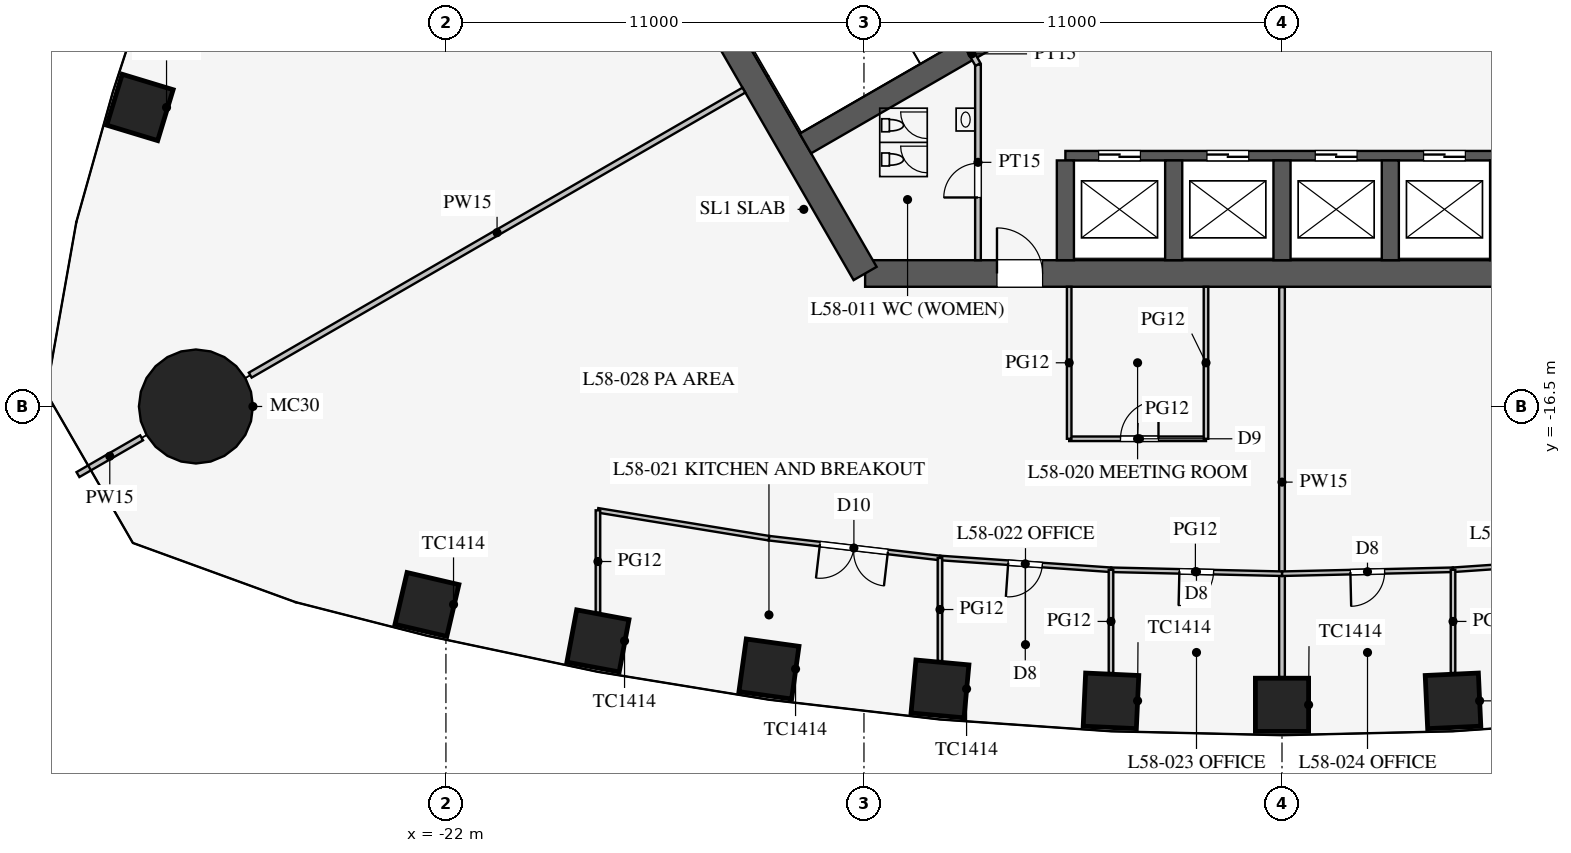
"""IFC4 building model, lengths in metres.
Left out: names, types, materials, properties, quantities, classifications, styles, units other than length and angle.
Written with IfcOpenShell. Run it as: python <this file> out.ifc"""

import sys

from ifc_helpers import new_model, si_unit, direction, frame, frame_2d, origin, origin_2d, place, context, subcontext, project, spatial, rectangle, circle, extrude, element, fill, save


model = new_model("IFC4")
c1 = context("Model", 3, precision=1e-05, world=origin(), true_north=direction((0.0, 1.0)))
c2 = subcontext(c1, "Body", "Model", "MODEL_VIEW")
j1 = project(units=[si_unit("LENGTHUNIT", "METRE"), si_unit("PLANEANGLEUNIT", "RADIAN")], contexts=[c1])
p1 = place(None, origin())
s1 = spatial("IfcSite", under=j1, at=p1, CompositionType="ELEMENT")
p2 = place(p1, origin())
s2 = spatial("IfcBuilding", under=s1, at=p2, CompositionType="ELEMENT")
p3 = place(p2, frame((0.0, 0.0, 252.7)))
s3 = spatial("IfcBuildingStorey", under=s2, at=p3, CompositionType="ELEMENT", Elevation=252.7)
for number, where, z_axis, x_axis in (
    (1, (-22.5, -21.71, 0.0), (0.0, 0.0, 1.0), (0.974, -0.227, 0.0)),
    (2, (-18.0, -22.669, 0.0), (0.0, 0.0, 1.0), (0.983, -0.184, 0.0)),
    (3, (-13.5, -23.408, 0.0), (0.0, 0.0, 1.0), (0.99, -0.138, 0.0)),
    (4, (-9.0, -23.933, 0.0), (0.0, 0.0, 1.0), (0.996, -0.092, 0.0)),
    (5, (-4.5, -24.246, 0.0), (0.0, 0.0, 1.0), (0.999, -0.046, 0.0)),
    (6, (0.0, -24.351, 0.0), (0.0, 0.0, 1.0), (1.0, 0.0, 0.0)),
    (7, (4.5, -24.246, 0.0), (0.0, 0.0, 1.0), (0.999, 0.046, 0.0)),
    (8, (-30.052, -8.63, 0.0), (0.0, 0.0, 1.0), (-0.29, -0.957, 0.0)),
):
    element("IfcColumn", number, at=place(p3, frame(where, z_axis=z_axis, x_axis=x_axis)), inside=s3, PredefinedType="COLUMN", context=c2, shape_type="SweptSolid", body=[
        extrude(rectangle(XDim=1.4, YDim=1.4, at=origin_2d()), origin(), (0.0, 0.0, 1.0), 4.2),
    ])
p4 = place(p3, frame((-28.579, -16.5, 0.0), z_axis=(0.0, 0.0, 1.0), x_axis=(1.0, 0.0, 0.0)))
e9 = element("IfcColumn", 9, at=p4, inside=s3, PredefinedType="COLUMN", context=c2, shape_type="SweptSolid", body=[
    extrude(circle(Radius=1.5, at=origin_2d()), origin(), (0.0, 0.0, 1.0), 4.2),
])
p5 = place(p3, frame((-10.97, -13.0, 0.0), z_axis=(0.0, 0.0, 1.0), x_axis=(1.0, 0.0, 0.0)))
e10 = element("IfcWall", 10, at=p5, inside=s3, PredefinedType="SHEAR", context=c2, shape_type="SweptSolid", body=[
    extrude(rectangle(XDim=21.939, YDim=0.7, at=frame_2d((10.97, 0.0))), origin(), (0.0, 0.0, 1.0), 4.2),
])
p6 = place(p5, frame((17.27, 0.0, 0.0)))
e11 = element("IfcOpeningElement", 11, at=p6, cuts=e10, PredefinedType="OPENING", context=c2, shape_type="SweptSolid", body=[
    extrude(rectangle(XDim=1.2, YDim=2.1, at=frame_2d((0.6, 1.05))), frame((0.0, 0.36, 0.0), z_axis=(0.0, -1.0, 0.0), x_axis=(1.0, 0.0, 0.0)), (0.0, 0.0, 1.0), 0.72),
])
p7 = place(p5, frame((3.47, 0.0, 0.0)))
e12 = element("IfcOpeningElement", 12, at=p7, cuts=e10, PredefinedType="OPENING", context=c2, shape_type="SweptSolid", body=[
    extrude(rectangle(XDim=1.2, YDim=2.1, at=frame_2d((0.6, 1.05))), frame((0.0, 0.36, 0.0), z_axis=(0.0, -1.0, 0.0), x_axis=(1.0, 0.0, 0.0)), (0.0, 0.0, 1.0), 0.72),
])
p8 = place(p3, frame((-16.743, -3.0, 0.0), z_axis=(0.0, 0.0, 1.0), x_axis=(0.499995765644, -0.866027848477, 0.0)))
e13 = element("IfcWall", 13, at=p8, inside=s3, PredefinedType="SHEAR", context=c2, shape_type="SweptSolid", body=[
    extrude(rectangle(XDim=11.547, YDim=0.7, at=frame_2d((5.773, 0.0))), origin(), (0.0, 0.0, 1.0), 4.2),
])
p9 = place(p3, frame((-5.7, -9.9, 0.0), z_axis=(0.0, 0.0, 1.0), x_axis=(1.0, 0.0, 0.0)))
e14 = element("IfcWall", 14, at=p9, inside=s3, PredefinedType="SHEAR", context=c2, shape_type="SweptSolid", body=[
    extrude(rectangle(XDim=11.4, YDim=0.25, at=frame_2d((5.7, 0.0))), origin(), (0.0, 0.0, 1.0), 4.2),
])
p10 = place(p9, frame((0.875, 0.0, 0.0)))
e15 = element("IfcOpeningElement", 15, at=p10, cuts=e14, PredefinedType="OPENING", context=c2, shape_type="SweptSolid", body=[
    extrude(rectangle(XDim=1.1, YDim=2.2, at=frame_2d((0.55, 1.1))), frame((0.0, 0.135, 0.0), z_axis=(0.0, -1.0, 0.0), x_axis=(1.0, 0.0, 0.0)), (0.0, 0.0, 1.0), 0.27),
])
p11 = place(p9, frame((3.725, 0.0, 0.0)))
e16 = element("IfcOpeningElement", 16, at=p11, cuts=e14, PredefinedType="OPENING", context=c2, shape_type="SweptSolid", body=[
    extrude(rectangle(XDim=1.1, YDim=2.2, at=frame_2d((0.55, 1.1))), frame((0.0, 0.135, 0.0), z_axis=(0.0, -1.0, 0.0), x_axis=(1.0, 0.0, 0.0)), (0.0, 0.0, 1.0), 0.27),
])
p12 = place(p9, frame((6.575, 0.0, 0.0)))
e17 = element("IfcOpeningElement", 17, at=p12, cuts=e14, PredefinedType="OPENING", context=c2, shape_type="SweptSolid", body=[
    extrude(rectangle(XDim=1.1, YDim=2.2, at=frame_2d((0.55, 1.1))), frame((0.0, 0.135, 0.0), z_axis=(0.0, -1.0, 0.0), x_axis=(1.0, 0.0, 0.0)), (0.0, 0.0, 1.0), 0.27),
])
p13 = place(p9, frame((9.425, 0.0, 0.0)))
e18 = element("IfcOpeningElement", 18, at=p13, cuts=e14, PredefinedType="OPENING", context=c2, shape_type="SweptSolid", body=[
    extrude(rectangle(XDim=1.1, YDim=2.2, at=frame_2d((0.55, 1.1))), frame((0.0, 0.135, 0.0), z_axis=(0.0, -1.0, 0.0), x_axis=(1.0, 0.0, 0.0)), (0.0, 0.0, 1.0), 0.27),
])
for number, where, z_axis, x_axis in (
    (19, (-5.7, -10.025, 0.0), (0.0, 0.0, 1.0), (0.0, -1.0, 0.0)),
    (20, (-2.85, -10.025, 0.0), (0.0, 0.0, 1.0), (0.0, -1.0, 0.0)),
    (21, (0.0, -10.025, 0.0), (0.0, 0.0, 1.0), (0.0, -1.0, 0.0)),
    (22, (2.85, -10.025, 0.0), (0.0, 0.0, 1.0), (0.0, -1.0, 0.0)),
    (23, (5.7, -10.025, 0.0), (0.0, 0.0, 1.0), (0.0, -1.0, 0.0)),
):
    element("IfcWall", number, at=place(p3, frame(where, z_axis=z_axis, x_axis=x_axis)), inside=s3, PredefinedType="SHEAR", context=c2, shape_type="SweptSolid", body=[
        extrude(rectangle(XDim=2.625, YDim=0.45, at=frame_2d((1.312, 0.0))), origin(), (0.0, 0.0, 1.0), 4.2),
    ])
for number, where, z_axis, x_axis in (
    (24, (4.638, -5.016, 0.0), (0.0, 0.0, 1.0), (0.866, -0.5, 0.0)),
    (25, (-4.638, -5.016, 0.0), (0.0, 0.0, 1.0), (-0.866, -0.5, 0.0)),
):
    element("IfcWall", number, at=place(p3, frame(where, z_axis=z_axis, x_axis=x_axis)), inside=s3, PredefinedType="SHEAR", context=c2, shape_type="SweptSolid", body=[
        extrude(rectangle(XDim=9.125, YDim=0.6, at=frame_2d((4.562, 0.0))), origin(), (0.0, 0.0, 1.0), 4.2),
    ])
p14 = place(p3, frame((-8.0, -7.5, 0.0), z_axis=(0.0, 0.0, 1.0), x_axis=(0.0, -1.0, 0.0)))
e26 = element("IfcWall", 26, at=p14, inside=s3, PredefinedType="PARTITIONING", context=c2, shape_type="SweptSolid", body=[
    extrude(rectangle(XDim=5.15, YDim=0.15, at=frame_2d((2.575, 0.0))), origin(), (0.0, 0.0, 1.0), 4.0),
])
p15 = place(p14, frame((2.6, 0.0, 0.0)))
e27 = element("IfcOpeningElement", 27, at=p15, cuts=e26, PredefinedType="OPENING", context=c2, shape_type="SweptSolid", body=[
    extrude(rectangle(XDim=0.9, YDim=2.1, at=frame_2d((0.45, 1.05))), frame((0.0, 0.085, 0.0), z_axis=(0.0, -1.0, 0.0), x_axis=(1.0, 0.0, 0.0)), (0.0, 0.0, 1.0), 0.17),
])
p16 = place(p3, frame((-8.0, -7.5, 0.0), z_axis=(0.0, 0.0, 1.0), x_axis=(-0.499842556608, 0.866116284689, 0.0)))
e28 = element("IfcWall", 28, at=p16, inside=s3, PredefinedType="PARTITIONING", context=c2, shape_type="SweptSolid", body=[
    extrude(rectangle(XDim=0.645, YDim=0.15, at=frame_2d((0.323, 0.0))), origin(), (0.0, 0.0, 1.0), 4.0),
])
p17 = place(p3, frame((-14.159, -8.175, 0.0), z_axis=(0.0, 0.0, 1.0), x_axis=(-0.866027028085, -0.499997186618, 0.0)))
e29 = element("IfcWall", 29, at=p17, inside=s3, PredefinedType="PARTITIONING", context=c2, shape_type="SweptSolid", body=[
    extrude(rectangle(XDim=15.0, YDim=0.15, at=frame_2d((7.5, 0.0))), origin(), (0.0, 0.0, 1.0), 2.4),
])
p18 = place(p3, frame((-30.008, -17.325, 0.0), z_axis=(0.0, 0.0, 1.0), x_axis=(-0.866013246922, -0.500021055713, 0.0)))
e30 = element("IfcWall", 30, at=p18, inside=s3, PredefinedType="PARTITIONING", context=c2, shape_type="SweptSolid", body=[
    extrude(rectangle(XDim=1.935, YDim=0.15, at=frame_2d((0.967, 0.0))), origin(), (0.0, 0.0, 1.0), 2.4),
])
p19 = place(p3, frame((0.0, -13.36, 0.0), z_axis=(0.0, 0.0, 1.0), x_axis=(0.0, -1.0, 0.0)))
e31 = element("IfcWall", 31, at=p19, inside=s3, PredefinedType="PARTITIONING", context=c2, shape_type="SweptSolid", body=[
    extrude(rectangle(XDim=10.26, YDim=0.15, at=frame_2d((5.13, 0.0))), origin(), (0.0, 0.0, 1.0), 2.992),
])
p20 = place(p3, frame((-5.6, -17.35, 0.0), z_axis=(0.0, 0.0, 1.0), x_axis=(1.0, 0.0, 0.0)))
e32 = element("IfcWall", 32, at=p20, inside=s3, PredefinedType="PARTITIONING", context=c2, shape_type="SweptSolid", body=[
    extrude(rectangle(XDim=3.6, YDim=0.12, at=frame_2d((1.8, 0.0))), origin(), (0.0, 0.0, 1.0), 2.9),
])
p21 = place(p20, frame((1.35, 0.0, 0.15)))
e33 = element("IfcOpeningElement", 33, at=p21, cuts=e32, PredefinedType="OPENING", context=c2, shape_type="SweptSolid", body=[
    extrude(rectangle(XDim=1.0, YDim=2.1, at=frame_2d((0.5, 1.05))), frame((0.0, 0.07, 0.0), z_axis=(0.0, -1.0, 0.0), x_axis=(1.0, 0.0, 0.0)), (0.0, 0.0, 1.0), 0.14),
])
for number, where, z_axis, x_axis in (
    (34, (-2.0, -13.35, 0.0), (0.0, 0.0, 1.0), (0.0, -1.0, 0.0)),
    (35, (-5.6, -13.35, 0.0), (0.0, 0.0, 1.0), (0.0, -1.0, 0.0)),
):
    element("IfcWall", number, at=place(p3, frame(where, z_axis=z_axis, x_axis=x_axis)), inside=s3, PredefinedType="PARTITIONING", context=c2, shape_type="SweptSolid", body=[
        extrude(rectangle(XDim=4.0, YDim=0.12, at=frame_2d((2.0, 0.0))), origin(), (0.0, 0.0, 1.0), 2.9),
    ])
p22 = place(p3, frame((0.0, -20.901, 0.0), z_axis=(0.0, 0.0, 1.0), x_axis=(0.99973552509, 0.022997388381, 0.0)))
e36 = element("IfcWall", 36, at=p22, inside=s3, PredefinedType="PARTITIONING", context=c2, shape_type="SweptSolid", body=[
    extrude(rectangle(XDim=4.501, YDim=0.12, at=frame_2d((2.25, 0.0))), origin(), (0.0, 0.0, 1.0), 2.9),
])
p23 = place(p22, frame((1.8, 0.0, 0.15)))
e37 = element("IfcOpeningElement", 37, at=p23, cuts=e36, PredefinedType="OPENING", context=c2, shape_type="SweptSolid", body=[
    extrude(rectangle(XDim=0.9, YDim=2.1, at=frame_2d((0.45, 1.05))), frame((0.0, 0.07, 0.0), z_axis=(0.0, -1.0, 0.0), x_axis=(1.0, 0.0, 0.0)), (0.0, 0.0, 1.0), 0.14),
])
p24 = place(p3, frame((4.5, -20.797, 0.0), z_axis=(0.0, 0.0, 1.0), x_axis=(0.997623533978, 0.068900540297, 0.0)))
e38 = element("IfcWall", 38, at=p24, inside=s3, PredefinedType="PARTITIONING", context=c2, shape_type="SweptSolid", body=[
    extrude(rectangle(XDim=4.511, YDim=0.12, at=frame_2d((2.255, 0.0))), origin(), (0.0, 0.0, 1.0), 2.9),
])
p25 = place(p24, frame((1.8, 0.0, 0.15)))
e39 = element("IfcOpeningElement", 39, at=p25, cuts=e38, PredefinedType="OPENING", context=c2, shape_type="SweptSolid", body=[
    extrude(rectangle(XDim=0.9, YDim=2.1, at=frame_2d((0.45, 1.05))), frame((0.0, 0.07, 0.0), z_axis=(0.0, -1.0, 0.0), x_axis=(1.0, 0.0, 0.0)), (0.0, 0.0, 1.0), 0.14),
])
p26 = place(p3, frame((-13.5, -19.966, 0.0), z_axis=(0.0, 0.0, 1.0), x_axis=(0.993382946625, -0.114849124309, 0.0)))
e40 = element("IfcWall", 40, at=p26, inside=s3, PredefinedType="PARTITIONING", context=c2, shape_type="SweptSolid", body=[
    extrude(rectangle(XDim=4.53, YDim=0.12, at=frame_2d((2.265, 0.0))), origin(), (0.0, 0.0, 1.0), 2.9),
])
p27 = place(p26, frame((1.35, 0.0, 0.15)))
e41 = element("IfcOpeningElement", 41, at=p27, cuts=e40, PredefinedType="OPENING", context=c2, shape_type="SweptSolid", body=[
    extrude(rectangle(XDim=1.8, YDim=2.1, at=frame_2d((0.9, 1.05))), frame((0.0, 0.07, 0.0), z_axis=(0.0, -1.0, 0.0), x_axis=(1.0, 0.0, 0.0)), (0.0, 0.0, 1.0), 0.14),
])
p28 = place(p3, frame((-18.0, -19.233, 0.0), z_axis=(0.0, 0.0, 1.0), x_axis=(0.986986525477, -0.160802980469, 0.0)))
e42 = element("IfcWall", 42, at=p28, inside=s3, PredefinedType="PARTITIONING", context=c2, shape_type="SweptSolid", body=[
    extrude(rectangle(XDim=4.559, YDim=0.12, at=frame_2d((2.28, 0.0))), origin(), (0.0, 0.0, 1.0), 2.9),
])
p29 = place(p3, frame((-4.5, -20.797, 0.0), z_axis=(0.0, 0.0, 1.0), x_axis=(0.99973552509, -0.022997388381, 0.0)))
e43 = element("IfcWall", 43, at=p29, inside=s3, PredefinedType="PARTITIONING", context=c2, shape_type="SweptSolid", body=[
    extrude(rectangle(XDim=4.501, YDim=0.12, at=frame_2d((2.25, 0.0))), origin(), (0.0, 0.0, 1.0), 2.9),
])
p30 = place(p29, frame((1.8, 0.0, 0.15)))
e44 = element("IfcOpeningElement", 44, at=p30, cuts=e43, PredefinedType="OPENING", context=c2, shape_type="SweptSolid", body=[
    extrude(rectangle(XDim=0.9, YDim=2.1, at=frame_2d((0.45, 1.05))), frame((0.0, 0.07, 0.0), z_axis=(0.0, -1.0, 0.0), x_axis=(1.0, 0.0, 0.0)), (0.0, 0.0, 1.0), 0.14),
])
p31 = place(p3, frame((-9.0, -20.486, 0.0), z_axis=(0.0, 0.0, 1.0), x_axis=(0.997623533978, -0.068900540297, 0.0)))
e45 = element("IfcWall", 45, at=p31, inside=s3, PredefinedType="PARTITIONING", context=c2, shape_type="SweptSolid", body=[
    extrude(rectangle(XDim=4.511, YDim=0.12, at=frame_2d((2.255, 0.0))), origin(), (0.0, 0.0, 1.0), 2.9),
])
p32 = place(p31, frame((1.8, 0.0, 0.15)))
e46 = element("IfcOpeningElement", 46, at=p32, cuts=e45, PredefinedType="OPENING", context=c2, shape_type="SweptSolid", body=[
    extrude(rectangle(XDim=0.9, YDim=2.1, at=frame_2d((0.45, 1.05))), frame((0.0, 0.07, 0.0), z_axis=(0.0, -1.0, 0.0), x_axis=(1.0, 0.0, 0.0)), (0.0, 0.0, 1.0), 0.14),
])
p33 = place(p3, frame((4.5, -20.797, 0.0), z_axis=(0.0, 0.0, 1.0), x_axis=(0.0, -1.0, 0.0)))
e47 = element("IfcWall", 47, at=p33, inside=s3, PredefinedType="PARTITIONING", context=c2, shape_type="SweptSolid", body=[
    extrude(rectangle(XDim=2.719, YDim=0.12, at=frame_2d((1.359, 0.0))), origin(), (0.0, 0.0, 1.0), 2.9),
])
p34 = place(p3, frame((-18.0, -19.233, 0.0), z_axis=(0.0, 0.0, 1.0), x_axis=(0.0, -1.0, 0.0)))
e48 = element("IfcWall", 48, at=p34, inside=s3, PredefinedType="PARTITIONING", context=c2, shape_type="SweptSolid", body=[
    extrude(rectangle(XDim=2.694, YDim=0.12, at=frame_2d((1.347, 0.0))), origin(), (0.0, 0.0, 1.0), 2.8),
])
p35 = place(p3, frame((-4.5, -20.797, 0.0), z_axis=(0.0, 0.0, 1.0), x_axis=(0.0, -1.0, 0.0)))
e49 = element("IfcWall", 49, at=p35, inside=s3, PredefinedType="PARTITIONING", context=c2, shape_type="SweptSolid", body=[
    extrude(rectangle(XDim=2.719, YDim=0.12, at=frame_2d((1.359, 0.0))), origin(), (0.0, 0.0, 1.0), 2.9),
])
p36 = place(p3, frame((-9.0, -20.486, 0.0), z_axis=(0.0, 0.0, 1.0), x_axis=(0.0, -1.0, 0.0)))
e50 = element("IfcWall", 50, at=p36, inside=s3, PredefinedType="PARTITIONING", context=c2, shape_type="SweptSolid", body=[
    extrude(rectangle(XDim=2.714, YDim=0.12, at=frame_2d((1.357, 0.0))), origin(), (0.0, 0.0, 1.0), 2.9),
])
p37 = place(p15, frame((0.9, 0.0, 0.0), z_axis=(0.0, 0.0, 1.0), x_axis=(-1.0, 0.0, 0.0)))
e51 = element("IfcDoor", 51, at=p37, inside=s3, OperationType="SINGLE_SWING_LEFT", PredefinedType="DOOR", context=c2, shape_type="SweptSolid", body=[
    extrude(rectangle(XDim=0.9, YDim=2.1, at=frame_2d((0.45, 1.05))), frame((0.0, 0.025, 0.0), z_axis=(0.0, -1.0, 0.0), x_axis=(1.0, 0.0, 0.0)), (0.0, 0.0, 1.0), 0.05),
])
fill(e27, e51)
p38 = place(p7, origin())
e52 = element("IfcDoor", 52, at=p38, inside=s3, OperationType="SINGLE_SWING_LEFT", PredefinedType="DOOR", context=c2, shape_type="SweptSolid", body=[
    extrude(rectangle(XDim=1.2, YDim=2.1, at=frame_2d((0.6, 1.05))), frame((0.0, 0.025, 0.0), z_axis=(0.0, -1.0, 0.0), x_axis=(1.0, 0.0, 0.0)), (0.0, 0.0, 1.0), 0.05),
])
fill(e12, e52)
p39 = place(p21, origin())
e53 = element("IfcDoor", 53, at=p39, inside=s3, OperationType="SINGLE_SWING_RIGHT", PredefinedType="DOOR", context=c2, shape_type="SweptSolid", body=[
    extrude(rectangle(XDim=1.0, YDim=2.1, at=frame_2d((0.5, 1.05))), frame((0.0, 0.025, 0.0), z_axis=(0.0, -1.0, 0.0), x_axis=(1.0, 0.0, 0.0)), (0.0, 0.0, 1.0), 0.05),
])
fill(e33, e53)
p40 = place(p27, frame((1.8, 0.0, 0.0), z_axis=(0.0, 0.0, 1.0), x_axis=(-1.0, 0.0, 0.0)))
e54 = element("IfcDoor", 54, at=p40, inside=s3, OperationType="DOUBLE_DOOR_SINGLE_SWING", PredefinedType="DOOR", context=c2, shape_type="SweptSolid", body=[
    extrude(rectangle(XDim=1.8, YDim=2.1, at=frame_2d((0.9, 1.05))), frame((0.0, 0.025, 0.0), z_axis=(0.0, -1.0, 0.0), x_axis=(1.0, 0.0, 0.0)), (0.0, 0.0, 1.0), 0.05),
])
fill(e41, e54)
p41 = place(p32, frame((0.9, 0.0, 0.0), z_axis=(0.0, 0.0, 1.0), x_axis=(-1.0, 0.0, 0.0)))
e55 = element("IfcDoor", 55, at=p41, inside=s3, OperationType="SINGLE_SWING_RIGHT", PredefinedType="DOOR", context=c2, shape_type="SweptSolid", body=[
    extrude(rectangle(XDim=0.9, YDim=2.1, at=frame_2d((0.45, 1.05))), frame((0.0, 0.025, 0.0), z_axis=(0.0, -1.0, 0.0), x_axis=(1.0, 0.0, 0.0)), (0.0, 0.0, 1.0), 0.05),
])
fill(e46, e55)
p42 = place(p30, frame((0.9, 0.0, 0.0), z_axis=(0.0, 0.0, 1.0), x_axis=(-1.0, 0.0, 0.0)))
e56 = element("IfcDoor", 56, at=p42, inside=s3, OperationType="SINGLE_SWING_RIGHT", PredefinedType="DOOR", context=c2, shape_type="SweptSolid", body=[
    extrude(rectangle(XDim=0.9, YDim=2.1, at=frame_2d((0.45, 1.05))), frame((0.0, 0.025, 0.0), z_axis=(0.0, -1.0, 0.0), x_axis=(1.0, 0.0, 0.0)), (0.0, 0.0, 1.0), 0.05),
])
fill(e44, e56)
p43 = place(p23, frame((0.9, 0.0, 0.0), z_axis=(0.0, 0.0, 1.0), x_axis=(-1.0, 0.0, 0.0)))
e57 = element("IfcDoor", 57, at=p43, inside=s3, OperationType="SINGLE_SWING_RIGHT", PredefinedType="DOOR", context=c2, shape_type="SweptSolid", body=[
    extrude(rectangle(XDim=0.9, YDim=2.1, at=frame_2d((0.45, 1.05))), frame((0.0, 0.025, 0.0), z_axis=(0.0, -1.0, 0.0), x_axis=(1.0, 0.0, 0.0)), (0.0, 0.0, 1.0), 0.05),
])
fill(e37, e57)
p44 = place(p10, origin())
e58 = element("IfcDoor", 58, at=p44, inside=s3, OperationType="DOUBLE_DOOR_SLIDING", PredefinedType="DOOR", context=c2, shape_type="SweptSolid", body=[
    extrude(rectangle(XDim=1.1, YDim=2.2, at=frame_2d((0.55, 1.1))), frame((0.0, 0.025, 0.0), z_axis=(0.0, -1.0, 0.0), x_axis=(1.0, 0.0, 0.0)), (0.0, 0.0, 1.0), 0.05),
])
fill(e15, e58)
p45 = place(p11, origin())
e59 = element("IfcDoor", 59, at=p45, inside=s3, OperationType="DOUBLE_DOOR_SLIDING", PredefinedType="DOOR", context=c2, shape_type="SweptSolid", body=[
    extrude(rectangle(XDim=1.1, YDim=2.2, at=frame_2d((0.55, 1.1))), frame((0.0, 0.025, 0.0), z_axis=(0.0, -1.0, 0.0), x_axis=(1.0, 0.0, 0.0)), (0.0, 0.0, 1.0), 0.05),
])
fill(e16, e59)
p46 = place(p12, origin())
e60 = element("IfcDoor", 60, at=p46, inside=s3, OperationType="DOUBLE_DOOR_SLIDING", PredefinedType="DOOR", context=c2, shape_type="SweptSolid", body=[
    extrude(rectangle(XDim=1.1, YDim=2.2, at=frame_2d((0.55, 1.1))), frame((0.0, 0.025, 0.0), z_axis=(0.0, -1.0, 0.0), x_axis=(1.0, 0.0, 0.0)), (0.0, 0.0, 1.0), 0.05),
])
fill(e17, e60)
p47 = place(p13, origin())
e61 = element("IfcDoor", 61, at=p47, inside=s3, OperationType="DOUBLE_DOOR_SLIDING", PredefinedType="DOOR", context=c2, shape_type="SweptSolid", body=[
    extrude(rectangle(XDim=1.1, YDim=2.2, at=frame_2d((0.55, 1.1))), frame((0.0, 0.025, 0.0), z_axis=(0.0, -1.0, 0.0), x_axis=(1.0, 0.0, 0.0)), (0.0, 0.0, 1.0), 0.05),
])
fill(e18, e61)
save(model, sys.argv[1])
